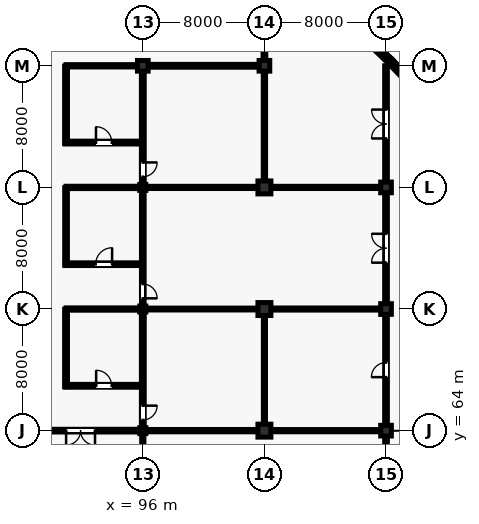
"""IFC4 building model, lengths in metres.
Left out: names, types, materials, properties, quantities, classifications, styles, units other than length and angle.
Written with IfcOpenShell. Run it as: python <this file> out.ifc"""

import sys

from ifc_helpers import new_model, si_unit, direction, frame, frame_2d, origin, origin_2d, place, context, subcontext, project, spatial, rectangle, i_section, extrude, element, fill, save


model = new_model("IFC4")
c1 = context("Model", 3, precision=1e-05, world=origin(), true_north=direction((0.0, 1.0)))
c2 = subcontext(c1, "Body", "Model", "MODEL_VIEW")
j1 = project(units=[si_unit("LENGTHUNIT", "METRE"), si_unit("PLANEANGLEUNIT", "RADIAN")], contexts=[c1])
p1 = place(None, origin())
s1 = spatial("IfcSite", under=j1, at=p1, CompositionType="ELEMENT")
p2 = place(p1, origin())
s2 = spatial("IfcBuilding", under=s1, at=p2, CompositionType="ELEMENT")
p3 = place(p2, origin())
s3 = spatial("IfcBuildingStorey", under=s2, at=p3, CompositionType="ELEMENT", Elevation=0.0)
for number, where, z_axis, x_axis in (
    (1, (96.0, 64.0, 0.0), (0.0, 0.0, 1.0), (1.0, 0.0, 0.0)),
    (2, (96.0, 72.0, 0.0), (0.0, 0.0, 1.0), (1.0, 0.0, 0.0)),
    (3, (96.0, 80.0, 0.0), (0.0, 0.0, 1.0), (1.0, 0.0, 0.0)),
):
    element("IfcColumn", number, at=place(p3, frame(where, z_axis=z_axis, x_axis=x_axis)), inside=s3, PredefinedType="COLUMN", context=c2, shape_type="SweptSolid", body=[
        extrude(i_section(OverallWidth=0.398, OverallDepth=0.387, WebThickness=0.021, FlangeThickness=0.033, FilletRadius=0.015, at=origin_2d()), origin(), (0.0, 0.0, 1.0), 5.28),
    ])
p4 = place(p3, frame((96.0, 88.0, 0.0), z_axis=(0.0, 0.0, 1.0), x_axis=(1.0, 0.0, 0.0)))
e4 = element("IfcColumn", 4, at=p4, inside=s3, PredefinedType="COLUMN", context=c2, shape_type="SweptSolid", body=[
    extrude(rectangle(XDim=0.7, YDim=0.7, at=origin_2d()), origin(), (0.0, 0.0, 1.0), 5.28),
])
for number, where, z_axis, x_axis in (
    (5, (104.0, 64.0, 0.0), (0.0, 0.0, 1.0), (1.0, 0.0, 0.0)),
    (6, (104.0, 72.0, 0.0), (0.0, 0.0, 1.0), (1.0, 0.0, 0.0)),
    (7, (104.0, 80.0, 0.0), (0.0, 0.0, 1.0), (1.0, 0.0, 0.0)),
):
    element("IfcColumn", number, at=place(p3, frame(where, z_axis=z_axis, x_axis=x_axis)), inside=s3, PredefinedType="COLUMN", context=c2, shape_type="SweptSolid", body=[
        extrude(rectangle(XDim=0.85, YDim=0.85, at=origin_2d()), origin(), (0.0, 0.0, 1.0), 5.28),
    ])
for number, where, z_axis, x_axis in (
    (8, (104.0, 88.0, 0.0), (0.0, 0.0, 1.0), (1.0, 0.0, 0.0)),
    (9, (112.0, 64.0, 0.0), (0.0, 0.0, 1.0), (1.0, 0.0, 0.0)),
    (10, (112.0, 72.0, 0.0), (0.0, 0.0, 1.0), (1.0, 0.0, 0.0)),
    (11, (112.0, 80.0, 0.0), (0.0, 0.0, 1.0), (1.0, 0.0, 0.0)),
):
    element("IfcColumn", number, at=place(p3, frame(where, z_axis=z_axis, x_axis=x_axis)), inside=s3, PredefinedType="COLUMN", context=c2, shape_type="SweptSolid", body=[
        extrude(rectangle(XDim=0.7, YDim=0.7, at=origin_2d()), origin(), (0.0, 0.0, 1.0), 5.28),
    ])
p5 = place(p3, frame((113.506, 86.971, 0.0), z_axis=(0.0, 0.0, 1.0), x_axis=(-0.693722700342, 0.720242191926, 0.0)))
e12 = element("IfcWall", 12, at=p5, inside=s3, PredefinedType="SOLIDWALL", context=c2, shape_type="SweptSolid", body=[
    extrude(rectangle(XDim=1.795, YDim=0.305, at=frame_2d((0.897, 0.0))), origin(), (0.0, 0.0, 1.0), 5.035),
])
p6 = place(p5, frame((0.347, 0.0, 0.9)))
e13 = element("IfcOpeningElement", 13, at=p6, cuts=e12, PredefinedType="OPENING", context=c2, shape_type="SweptSolid", body=[
    extrude(rectangle(XDim=1.1, YDim=2.1, at=frame_2d((0.55, 1.05))), frame((0.0, 0.162, 0.0), z_axis=(0.0, -1.0, 0.0), x_axis=(1.0, 0.0, 0.0)), (0.0, 0.0, 1.0), 0.325),
])
p7 = place(p3, frame((112.264, 88.26, 0.0), z_axis=(0.0, 0.0, 1.0), x_axis=(-0.720242191926, 0.693722700342, 0.0)))
e14 = element("IfcWall", 14, at=p7, inside=s3, PredefinedType="SOLIDWALL", context=c2, shape_type="SweptSolid", body=[
    extrude(rectangle(XDim=1.795, YDim=0.305, at=frame_2d((0.897, 0.0))), origin(), (0.0, 0.0, 1.0), 5.035),
])
p8 = place(p7, frame((0.347, 0.0, 0.9)))
e15 = element("IfcOpeningElement", 15, at=p8, cuts=e14, PredefinedType="OPENING", context=c2, shape_type="SweptSolid", body=[
    extrude(rectangle(XDim=1.1, YDim=2.1, at=frame_2d((0.55, 1.05))), frame((0.0, 0.162, 0.0), z_axis=(0.0, -1.0, 0.0), x_axis=(1.0, 0.0, 0.0)), (0.0, 0.0, 1.0), 0.325),
])
p9 = place(p3, frame((90.9, 66.95, 0.0), z_axis=(0.0, 0.0, 1.0), x_axis=(1.0, 0.0, 0.0)))
e16 = element("IfcWall", 16, at=p9, inside=s3, PredefinedType="PARTITIONING", context=c2, shape_type="SweptSolid", body=[
    extrude(rectangle(XDim=5.08, YDim=0.185, at=frame_2d((2.54, 0.0))), origin(), (0.0, 0.0, 1.0), 4.403),
])
p10 = place(p9, frame((2.03, 0.0, 0.0)))
e17 = element("IfcOpeningElement", 17, at=p10, cuts=e16, PredefinedType="OPENING", context=c2, shape_type="SweptSolid", body=[
    extrude(rectangle(XDim=1.02, YDim=2.2, at=frame_2d((0.51, 1.1))), frame((0.0, 0.103, 0.0), z_axis=(0.0, -1.0, 0.0), x_axis=(1.0, 0.0, 0.0)), (0.0, 0.0, 1.0), 0.205),
])
p11 = place(p3, frame((90.95, 66.9, 0.0), z_axis=(0.0, 0.0, 1.0), x_axis=(0.0, 1.0, 0.0)))
e18 = element("IfcWall", 18, at=p11, inside=s3, PredefinedType="PARTITIONING", context=c2, shape_type="SweptSolid", body=[
    extrude(rectangle(XDim=5.08, YDim=0.185, at=frame_2d((2.54, 0.0))), origin(), (0.0, 0.0, 1.0), 4.262),
])
p12 = place(p3, frame((90.95, 72.0, 0.0), z_axis=(0.0, 0.0, 1.0), x_axis=(1.0, 0.0, 0.0)))
e19 = element("IfcWall", 19, at=p12, inside=s3, PredefinedType="PARTITIONING", context=c2, shape_type="SweptSolid", body=[
    extrude(rectangle(XDim=4.841, YDim=0.15, at=frame_2d((2.42, 0.0))), origin(), (0.0, 0.0, 1.0), 4.262),
])
p13 = place(p3, frame((90.9, 74.95, 0.0), z_axis=(0.0, 0.0, 1.0), x_axis=(1.0, 0.0, 0.0)))
e20 = element("IfcWall", 20, at=p13, inside=s3, PredefinedType="PARTITIONING", context=c2, shape_type="SweptSolid", body=[
    extrude(rectangle(XDim=5.08, YDim=0.175, at=frame_2d((2.54, 0.0))), origin(), (0.0, 0.0, 1.0), 4.412),
])
p14 = place(p13, frame((2.0, 0.0, 0.0)))
e21 = element("IfcOpeningElement", 21, at=p14, cuts=e20, PredefinedType="OPENING", context=c2, shape_type="SweptSolid", body=[
    extrude(rectangle(XDim=1.08, YDim=2.2, at=frame_2d((0.54, 1.1))), frame((0.0, 0.097, 0.0), z_axis=(0.0, -1.0, 0.0), x_axis=(1.0, 0.0, 0.0)), (0.0, 0.0, 1.0), 0.195),
])
p15 = place(p3, frame((90.95, 74.9, 0.0), z_axis=(0.0, 0.0, 1.0), x_axis=(0.0, 1.0, 0.0)))
e22 = element("IfcWall", 22, at=p15, inside=s3, PredefinedType="PARTITIONING", context=c2, shape_type="SweptSolid", body=[
    extrude(rectangle(XDim=5.08, YDim=0.175, at=frame_2d((2.54, 0.0))), origin(), (0.0, 0.0, 1.0), 4.403),
])
p16 = place(p3, frame((90.95, 80.0, 0.0), z_axis=(0.0, 0.0, 1.0), x_axis=(1.0, 0.0, 0.0)))
e23 = element("IfcWall", 23, at=p16, inside=s3, PredefinedType="PARTITIONING", context=c2, shape_type="SweptSolid", body=[
    extrude(rectangle(XDim=4.841, YDim=0.15, at=frame_2d((2.42, 0.0))), origin(), (0.0, 0.0, 1.0), 4.403),
])
p17 = place(p3, frame((90.9, 82.95, 0.0), z_axis=(0.0, 0.0, 1.0), x_axis=(1.0, 0.0, 0.0)))
e24 = element("IfcWall", 24, at=p17, inside=s3, PredefinedType="PARTITIONING", context=c2, shape_type="SweptSolid", body=[
    extrude(rectangle(XDim=5.08, YDim=0.185, at=frame_2d((2.54, 0.0))), origin(), (0.0, 0.0, 1.0), 4.404),
])
p18 = place(p17, frame((2.02, 0.0, 0.0)))
e25 = element("IfcOpeningElement", 25, at=p18, cuts=e24, PredefinedType="OPENING", context=c2, shape_type="SweptSolid", body=[
    extrude(rectangle(XDim=1.04, YDim=2.18, at=frame_2d((0.52, 1.09))), frame((0.0, 0.103, 0.0), z_axis=(0.0, -1.0, 0.0), x_axis=(1.0, 0.0, 0.0)), (0.0, 0.0, 1.0), 0.205),
])
p19 = place(p3, frame((90.95, 82.9, 0.0), z_axis=(0.0, 0.0, 1.0), x_axis=(0.0, 1.0, 0.0)))
e26 = element("IfcWall", 26, at=p19, inside=s3, PredefinedType="PARTITIONING", context=c2, shape_type="SweptSolid", body=[
    extrude(rectangle(XDim=5.08, YDim=0.185, at=frame_2d((2.54, 0.0))), origin(), (0.0, 0.0, 1.0), 4.336),
])
p20 = place(p3, frame((90.95, 88.0, 0.0), z_axis=(0.0, 0.0, 1.0), x_axis=(1.0, 0.0, 0.0)))
e27 = element("IfcWall", 27, at=p20, inside=s3, PredefinedType="PARTITIONING", context=c2, shape_type="SweptSolid", body=[
    extrude(rectangle(XDim=4.69, YDim=0.15, at=frame_2d((2.345, 0.0))), origin(), (0.0, 0.0, 1.0), 4.336),
])
p21 = place(p3, frame((96.0, 56.184, 0.0), z_axis=(0.0, 0.0, 1.0), x_axis=(0.0, 1.0, 0.0)))
e28 = element("IfcWall", 28, at=p21, inside=s3, PredefinedType="PARTITIONING", context=c2, shape_type="SweptSolid", body=[
    extrude(rectangle(XDim=7.633, YDim=0.142, at=frame_2d((3.816, 0.0))), origin(), (0.0, 0.0, 1.0), 4.471),
])
p22 = place(p3, frame((88.0, 64.0, 0.0), z_axis=(0.0, 0.0, 1.0), x_axis=(1.0, 0.0, 0.0)))
e29 = element("IfcWall", 29, at=p22, inside=s3, PredefinedType="PARTITIONING", context=c2, shape_type="SweptSolid", body=[
    extrude(rectangle(XDim=7.811, YDim=0.175, at=frame_2d((3.906, 0.0))), origin(), (0.0, 0.0, 1.0), 4.25),
])
p23 = place(p22, frame((2.956, 0.0, 0.0)))
e30 = element("IfcOpeningElement", 30, at=p23, cuts=e29, PredefinedType="OPENING", context=c2, shape_type="SweptSolid", body=[
    extrude(rectangle(XDim=1.9, YDim=2.38, at=frame_2d((0.95, 1.19))), frame((0.0, 0.097, 0.0), z_axis=(0.0, -1.0, 0.0), x_axis=(1.0, 0.0, 0.0)), (0.0, 0.0, 1.0), 0.195),
])
p24 = place(p3, frame((96.0, 64.184, 0.0), z_axis=(0.0, 0.0, 1.0), x_axis=(0.0, 1.0, 0.0)))
e31 = element("IfcWall", 31, at=p24, inside=s3, PredefinedType="PARTITIONING", context=c2, shape_type="SweptSolid", body=[
    extrude(rectangle(XDim=7.633, YDim=0.185, at=frame_2d((3.816, 0.0))), origin(), (0.0, 0.0, 1.0), 4.403),
])
p25 = place(p24, frame((0.52, 0.0, 0.0)))
e32 = element("IfcOpeningElement", 32, at=p25, cuts=e31, PredefinedType="OPENING", context=c2, shape_type="SweptSolid", body=[
    extrude(rectangle(XDim=0.94, YDim=2.12, at=frame_2d((0.47, 1.06))), frame((0.0, 0.103, 0.0), z_axis=(0.0, -1.0, 0.0), x_axis=(1.0, 0.0, 0.0)), (0.0, 0.0, 1.0), 0.205),
])
p26 = place(p3, frame((96.0, 72.184, 0.0), z_axis=(0.0, 0.0, 1.0), x_axis=(0.0, 1.0, 0.0)))
e33 = element("IfcWall", 33, at=p26, inside=s3, PredefinedType="PARTITIONING", context=c2, shape_type="SweptSolid", body=[
    extrude(rectangle(XDim=7.633, YDim=0.175, at=frame_2d((3.816, 0.0))), origin(), (0.0, 0.0, 1.0), 4.412),
])
p27 = place(p26, frame((0.52, 0.0, 0.0)))
e34 = element("IfcOpeningElement", 34, at=p27, cuts=e33, PredefinedType="OPENING", context=c2, shape_type="SweptSolid", body=[
    extrude(rectangle(XDim=0.94, YDim=2.12, at=frame_2d((0.47, 1.06))), frame((0.0, 0.097, 0.0), z_axis=(0.0, -1.0, 0.0), x_axis=(1.0, 0.0, 0.0)), (0.0, 0.0, 1.0), 0.195),
])
p28 = place(p3, frame((96.0, 80.184, 0.0), z_axis=(0.0, 0.0, 1.0), x_axis=(0.0, 1.0, 0.0)))
e35 = element("IfcWall", 35, at=p28, inside=s3, PredefinedType="PARTITIONING", context=c2, shape_type="SweptSolid", body=[
    extrude(rectangle(XDim=7.476, YDim=0.185, at=frame_2d((3.738, 0.0))), origin(), (0.0, 0.0, 1.0), 4.404),
])
p29 = place(p28, frame((0.52, 0.0, 0.0)))
e36 = element("IfcOpeningElement", 36, at=p29, cuts=e35, PredefinedType="OPENING", context=c2, shape_type="SweptSolid", body=[
    extrude(rectangle(XDim=0.94, YDim=2.12, at=frame_2d((0.47, 1.06))), frame((0.0, 0.103, 0.0), z_axis=(0.0, -1.0, 0.0), x_axis=(1.0, 0.0, 0.0)), (0.0, 0.0, 1.0), 0.205),
])
p30 = place(p3, frame((96.189, 64.0, 0.0), z_axis=(0.0, 0.0, 1.0), x_axis=(1.0, 0.0, 0.0)))
e37 = element("IfcWall", 37, at=p30, inside=s3, PredefinedType="PARTITIONING", context=c2, shape_type="SweptSolid", body=[
    extrude(rectangle(XDim=7.396, YDim=0.15, at=frame_2d((3.698, 0.0))), origin(), (0.0, 0.0, 1.0), 4.327),
])
p31 = place(p3, frame((104.0, 64.415, 0.0), z_axis=(0.0, 0.0, 1.0), x_axis=(0.0, 1.0, 0.0)))
e38 = element("IfcWall", 38, at=p31, inside=s3, PredefinedType="PARTITIONING", context=c2, shape_type="SweptSolid", body=[
    extrude(rectangle(XDim=7.17, YDim=0.135, at=frame_2d((3.585, 0.0))), origin(), (0.0, 0.0, 1.0), 4.412),
])
p32 = place(p3, frame((96.189, 72.0, 0.0), z_axis=(0.0, 0.0, 1.0), x_axis=(1.0, 0.0, 0.0)))
e39 = element("IfcWall", 39, at=p32, inside=s3, PredefinedType="PARTITIONING", context=c2, shape_type="SweptSolid", body=[
    extrude(rectangle(XDim=7.396, YDim=0.12, at=frame_2d((3.698, 0.0))), origin(), (0.0, 0.0, 1.0), 4.403),
])
p33 = place(p3, frame((96.189, 80.0, 0.0), z_axis=(0.0, 0.0, 1.0), x_axis=(1.0, 0.0, 0.0)))
e40 = element("IfcWall", 40, at=p33, inside=s3, PredefinedType="PARTITIONING", context=c2, shape_type="SweptSolid", body=[
    extrude(rectangle(XDim=7.396, YDim=0.142, at=frame_2d((3.698, 0.0))), origin(), (0.0, 0.0, 1.0), 4.336),
])
p34 = place(p3, frame((104.0, 80.415, 0.0), z_axis=(0.0, 0.0, 1.0), x_axis=(0.0, 1.0, 0.0)))
e41 = element("IfcWall", 41, at=p34, inside=s3, PredefinedType="PARTITIONING", context=c2, shape_type="SweptSolid", body=[
    extrude(rectangle(XDim=7.245, YDim=0.15, at=frame_2d((3.623, 0.0))), origin(), (0.0, 0.0, 1.0), 4.471),
])
p35 = place(p3, frame((96.34, 88.0, 0.0), z_axis=(0.0, 0.0, 1.0), x_axis=(1.0, 0.0, 0.0)))
e42 = element("IfcWall", 42, at=p35, inside=s3, PredefinedType="PARTITIONING", context=c2, shape_type="SweptSolid", body=[
    extrude(rectangle(XDim=7.32, YDim=0.185, at=frame_2d((3.66, 0.0))), origin(), (0.0, 0.0, 1.0), 4.404),
])
p36 = place(p3, frame((104.0, 88.34, 0.0), z_axis=(0.0, 0.0, 1.0), x_axis=(0.0, 1.0, 0.0)))
e43 = element("IfcWall", 43, at=p36, inside=s3, PredefinedType="PARTITIONING", context=c2, shape_type="SweptSolid", body=[
    extrude(rectangle(XDim=7.66, YDim=0.175, at=frame_2d((3.83, 0.0))), origin(), (0.0, 0.0, 1.0), 5.025),
])
p37 = place(p36, frame((2.88, 0.0, 0.0)))
e44 = element("IfcOpeningElement", 44, at=p37, cuts=e43, PredefinedType="OPENING", context=c2, shape_type="SweptSolid", body=[
    extrude(rectangle(XDim=1.9, YDim=2.38, at=frame_2d((0.95, 1.19))), frame((0.0, 0.097, 0.0), z_axis=(0.0, -1.0, 0.0), x_axis=(1.0, 0.0, 0.0)), (0.0, 0.0, 1.0), 0.195),
])
p38 = place(p3, frame((112.0, 56.39, 0.0), z_axis=(0.0, 0.0, 1.0), x_axis=(0.0, 1.0, 0.0)))
e45 = element("IfcWall", 45, at=p38, inside=s3, PredefinedType="PARTITIONING", context=c2, shape_type="SweptSolid", body=[
    extrude(rectangle(XDim=7.27, YDim=0.175, at=frame_2d((3.635, 0.0))), origin(), (0.0, 0.0, 1.0), 4.412),
])
p39 = place(p38, frame((2.685, 0.0, 0.0)))
e46 = element("IfcOpeningElement", 46, at=p39, cuts=e45, PredefinedType="OPENING", context=c2, shape_type="SweptSolid", body=[
    extrude(rectangle(XDim=1.9, YDim=2.38, at=frame_2d((0.95, 1.19))), frame((0.0, 0.097, 0.0), z_axis=(0.0, -1.0, 0.0), x_axis=(1.0, 0.0, 0.0)), (0.0, 0.0, 1.0), 0.195),
])
p40 = place(p3, frame((104.415, 64.0, 0.0), z_axis=(0.0, 0.0, 1.0), x_axis=(1.0, 0.0, 0.0)))
e47 = element("IfcWall", 47, at=p40, inside=s3, PredefinedType="PARTITIONING", context=c2, shape_type="SweptSolid", body=[
    extrude(rectangle(XDim=7.245, YDim=0.142, at=frame_2d((3.623, 0.0))), origin(), (0.0, 0.0, 1.0), 4.403),
])
p41 = place(p3, frame((112.0, 64.34, 0.0), z_axis=(0.0, 0.0, 1.0), x_axis=(0.0, 1.0, 0.0)))
e48 = element("IfcWall", 48, at=p41, inside=s3, PredefinedType="PARTITIONING", context=c2, shape_type="SweptSolid", body=[
    extrude(rectangle(XDim=7.32, YDim=0.175, at=frame_2d((3.66, 0.0))), origin(), (0.0, 0.0, 1.0), 4.404),
])
p42 = place(p41, frame((3.18, 0.0, 0.0)))
e49 = element("IfcOpeningElement", 49, at=p42, cuts=e48, PredefinedType="OPENING", context=c2, shape_type="SweptSolid", body=[
    extrude(rectangle(XDim=0.96, YDim=2.14, at=frame_2d((0.48, 1.07))), frame((0.0, 0.097, 0.0), z_axis=(0.0, -1.0, 0.0), x_axis=(1.0, 0.0, 0.0)), (0.0, 0.0, 1.0), 0.195),
])
p43 = place(p3, frame((104.415, 72.0, 0.0), z_axis=(0.0, 0.0, 1.0), x_axis=(1.0, 0.0, 0.0)))
e50 = element("IfcWall", 50, at=p43, inside=s3, PredefinedType="PARTITIONING", context=c2, shape_type="SweptSolid", body=[
    extrude(rectangle(XDim=7.245, YDim=0.135, at=frame_2d((3.623, 0.0))), origin(), (0.0, 0.0, 1.0), 4.336),
])
p44 = place(p3, frame((112.0, 72.34, 0.0), z_axis=(0.0, 0.0, 1.0), x_axis=(0.0, 1.0, 0.0)))
e51 = element("IfcWall", 51, at=p44, inside=s3, PredefinedType="PARTITIONING", context=c2, shape_type="SweptSolid", body=[
    extrude(rectangle(XDim=7.32, YDim=0.175, at=frame_2d((3.66, 0.0))), origin(), (0.0, 0.0, 1.0), 4.471),
])
p45 = place(p44, frame((2.71, 0.0, 0.0)))
e52 = element("IfcOpeningElement", 52, at=p45, cuts=e51, PredefinedType="OPENING", context=c2, shape_type="SweptSolid", body=[
    extrude(rectangle(XDim=1.9, YDim=2.38, at=frame_2d((0.95, 1.19))), frame((0.0, 0.097, 0.0), z_axis=(0.0, -1.0, 0.0), x_axis=(1.0, 0.0, 0.0)), (0.0, 0.0, 1.0), 0.195),
])
p46 = place(p3, frame((104.415, 80.0, 0.0), z_axis=(0.0, 0.0, 1.0), x_axis=(1.0, 0.0, 0.0)))
e53 = element("IfcWall", 53, at=p46, inside=s3, PredefinedType="PARTITIONING", context=c2, shape_type="SweptSolid", body=[
    extrude(rectangle(XDim=7.245, YDim=0.142, at=frame_2d((3.623, 0.0))), origin(), (0.0, 0.0, 1.0), 4.404),
])
p47 = place(p3, frame((112.0, 80.34, 0.0), z_axis=(0.0, 0.0, 1.0), x_axis=(0.0, 1.0, 0.0)))
e54 = element("IfcWall", 54, at=p47, inside=s3, PredefinedType="PARTITIONING", context=c2, shape_type="SweptSolid", body=[
    extrude(rectangle(XDim=7.66, YDim=0.175, at=frame_2d((3.83, 0.0))), origin(), (0.0, 0.0, 1.0), 5.025),
])
p48 = place(p47, frame((2.88, 0.0, 0.0)))
e55 = element("IfcOpeningElement", 55, at=p48, cuts=e54, PredefinedType="OPENING", context=c2, shape_type="SweptSolid", body=[
    extrude(rectangle(XDim=1.9, YDim=2.38, at=frame_2d((0.95, 1.19))), frame((0.0, 0.097, 0.0), z_axis=(0.0, -1.0, 0.0), x_axis=(1.0, 0.0, 0.0)), (0.0, 0.0, 1.0), 0.195),
])
p49 = place(p6, origin())
e56 = element("IfcWindow", 56, at=p49, inside=s3, PartitioningType="SINGLE_PANEL", PredefinedType="WINDOW", context=c2, shape_type="SweptSolid", body=[
    extrude(rectangle(XDim=1.1, YDim=2.1, at=frame_2d((0.55, 1.05))), frame((0.0, 0.03, 0.0), z_axis=(0.0, -1.0, 0.0), x_axis=(1.0, 0.0, 0.0)), (0.0, 0.0, 1.0), 0.06),
])
fill(e13, e56)
p50 = place(p8, origin())
e57 = element("IfcWindow", 57, at=p50, inside=s3, PartitioningType="SINGLE_PANEL", PredefinedType="WINDOW", context=c2, shape_type="SweptSolid", body=[
    extrude(rectangle(XDim=1.1, YDim=2.1, at=frame_2d((0.55, 1.05))), frame((0.0, 0.03, 0.0), z_axis=(0.0, -1.0, 0.0), x_axis=(1.0, 0.0, 0.0)), (0.0, 0.0, 1.0), 0.06),
])
fill(e15, e57)
p51 = place(p10, origin())
e58 = element("IfcDoor", 58, at=p51, inside=s3, OperationType="SINGLE_SWING_LEFT", PredefinedType="DOOR", context=c2, shape_type="SweptSolid", body=[
    extrude(rectangle(XDim=1.02, YDim=2.2, at=frame_2d((0.51, 1.1))), frame((0.0, 0.025, 0.0), z_axis=(0.0, -1.0, 0.0), x_axis=(1.0, 0.0, 0.0)), (0.0, 0.0, 1.0), 0.05),
])
fill(e17, e58)
p52 = place(p14, origin())
e59 = element("IfcDoor", 59, at=p52, inside=s3, OperationType="SINGLE_SWING_RIGHT", PredefinedType="DOOR", context=c2, shape_type="SweptSolid", body=[
    extrude(rectangle(XDim=1.08, YDim=2.2, at=frame_2d((0.54, 1.1))), frame((0.0, 0.025, 0.0), z_axis=(0.0, -1.0, 0.0), x_axis=(1.0, 0.0, 0.0)), (0.0, 0.0, 1.0), 0.05),
])
fill(e21, e59)
p53 = place(p18, origin())
e60 = element("IfcDoor", 60, at=p53, inside=s3, OperationType="SINGLE_SWING_LEFT", PredefinedType="DOOR", context=c2, shape_type="SweptSolid", body=[
    extrude(rectangle(XDim=1.04, YDim=2.18, at=frame_2d((0.52, 1.09))), frame((0.0, 0.025, 0.0), z_axis=(0.0, -1.0, 0.0), x_axis=(1.0, 0.0, 0.0)), (0.0, 0.0, 1.0), 0.05),
])
fill(e25, e60)
p54 = place(p23, frame((1.9, 0.0, 0.0), z_axis=(0.0, 0.0, 1.0), x_axis=(-1.0, 0.0, 0.0)))
e61 = element("IfcDoor", 61, at=p54, inside=s3, OperationType="DOUBLE_DOOR_SINGLE_SWING", PredefinedType="DOOR", context=c2, shape_type="SweptSolid", body=[
    extrude(rectangle(XDim=1.9, YDim=2.38, at=frame_2d((0.95, 1.19))), frame((0.0, 0.025, 0.0), z_axis=(0.0, -1.0, 0.0), x_axis=(1.0, 0.0, 0.0)), (0.0, 0.0, 1.0), 0.05),
])
fill(e30, e61)
p55 = place(p25, frame((0.94, 0.0, 0.0), z_axis=(0.0, 0.0, 1.0), x_axis=(-1.0, 0.0, 0.0)))
e62 = element("IfcDoor", 62, at=p55, inside=s3, OperationType="SINGLE_SWING_RIGHT", PredefinedType="DOOR", context=c2, shape_type="SweptSolid", body=[
    extrude(rectangle(XDim=0.94, YDim=2.12, at=frame_2d((0.47, 1.06))), frame((0.0, 0.025, 0.0), z_axis=(0.0, -1.0, 0.0), x_axis=(1.0, 0.0, 0.0)), (0.0, 0.0, 1.0), 0.05),
])
fill(e32, e62)
p56 = place(p27, frame((0.94, 0.0, 0.0), z_axis=(0.0, 0.0, 1.0), x_axis=(-1.0, 0.0, 0.0)))
e63 = element("IfcDoor", 63, at=p56, inside=s3, OperationType="SINGLE_SWING_LEFT", PredefinedType="DOOR", context=c2, shape_type="SweptSolid", body=[
    extrude(rectangle(XDim=0.94, YDim=2.12, at=frame_2d((0.47, 1.06))), frame((0.0, 0.025, 0.0), z_axis=(0.0, -1.0, 0.0), x_axis=(1.0, 0.0, 0.0)), (0.0, 0.0, 1.0), 0.05),
])
fill(e34, e63)
p57 = place(p29, frame((0.94, 0.0, 0.0), z_axis=(0.0, 0.0, 1.0), x_axis=(-1.0, 0.0, 0.0)))
e64 = element("IfcDoor", 64, at=p57, inside=s3, OperationType="SINGLE_SWING_RIGHT", PredefinedType="DOOR", context=c2, shape_type="SweptSolid", body=[
    extrude(rectangle(XDim=0.94, YDim=2.12, at=frame_2d((0.47, 1.06))), frame((0.0, 0.025, 0.0), z_axis=(0.0, -1.0, 0.0), x_axis=(1.0, 0.0, 0.0)), (0.0, 0.0, 1.0), 0.05),
])
fill(e36, e64)
p58 = place(p42, origin())
e65 = element("IfcDoor", 65, at=p58, inside=s3, OperationType="SINGLE_SWING_LEFT", PredefinedType="DOOR", context=c2, shape_type="SweptSolid", body=[
    extrude(rectangle(XDim=0.96, YDim=2.14, at=frame_2d((0.48, 1.07))), frame((0.0, 0.025, 0.0), z_axis=(0.0, -1.0, 0.0), x_axis=(1.0, 0.0, 0.0)), (0.0, 0.0, 1.0), 0.05),
])
fill(e49, e65)
p59 = place(p45, origin())
e66 = element("IfcDoor", 66, at=p59, inside=s3, OperationType="DOUBLE_DOOR_SINGLE_SWING", PredefinedType="DOOR", context=c2, shape_type="SweptSolid", body=[
    extrude(rectangle(XDim=1.9, YDim=2.38, at=frame_2d((0.95, 1.19))), frame((0.0, 0.025, 0.0), z_axis=(0.0, -1.0, 0.0), x_axis=(1.0, 0.0, 0.0)), (0.0, 0.0, 1.0), 0.05),
])
fill(e52, e66)
p60 = place(p48, origin())
e67 = element("IfcDoor", 67, at=p60, inside=s3, OperationType="DOUBLE_DOOR_SINGLE_SWING", PredefinedType="DOOR", context=c2, shape_type="SweptSolid", body=[
    extrude(rectangle(XDim=1.9, YDim=2.38, at=frame_2d((0.95, 1.19))), frame((0.0, 0.025, 0.0), z_axis=(0.0, -1.0, 0.0), x_axis=(1.0, 0.0, 0.0)), (0.0, 0.0, 1.0), 0.05),
])
fill(e55, e67)
save(model, sys.argv[1])
